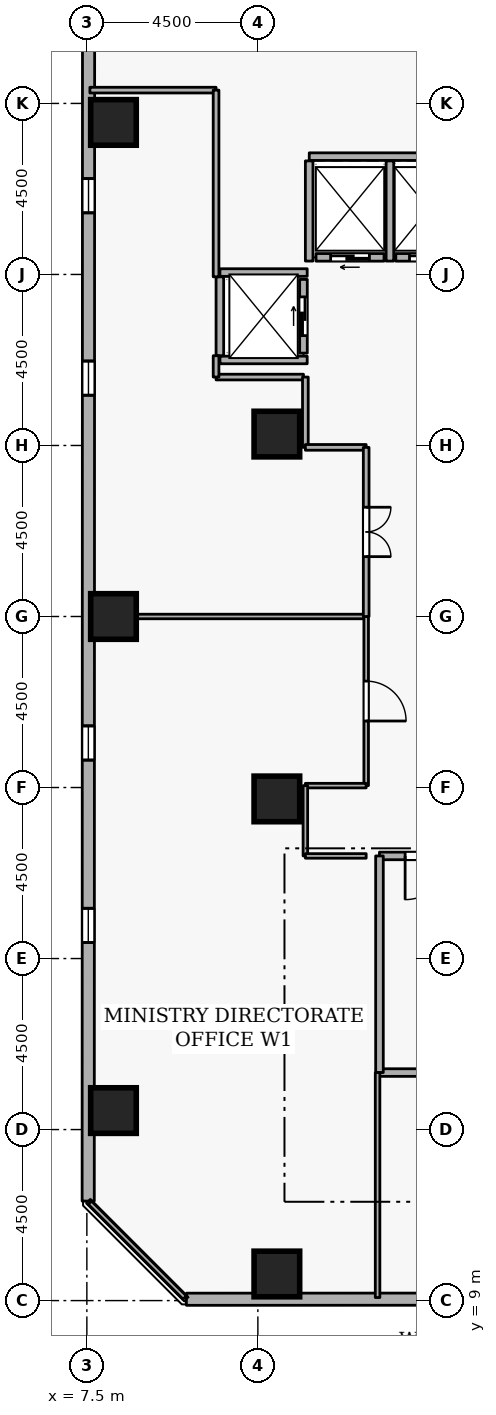
"""IFC4 building model, lengths in metres.
Left out: names, types, materials, properties, quantities, classifications, styles, units other than length and angle.
Written with IfcOpenShell. Run it as: python <this file> out.ifc"""

import sys

from ifc_helpers import new_model, si_unit, direction, frame, frame_2d, origin, origin_2d, place, context, subcontext, project, spatial, rectangle, extrude, element, fill, save


model = new_model("IFC4")
c1 = context("Model", 3, precision=1e-05, world=origin(), true_north=direction((0.0, 1.0)))
c2 = subcontext(c1, "Body", "Model", "MODEL_VIEW")
j1 = project(units=[si_unit("LENGTHUNIT", "METRE"), si_unit("PLANEANGLEUNIT", "RADIAN")], contexts=[c1])
p1 = place(None, origin())
s1 = spatial("IfcSite", under=j1, at=p1, CompositionType="ELEMENT")
p2 = place(p1, origin())
s2 = spatial("IfcBuilding", under=s1, at=p2, CompositionType="ELEMENT")
p3 = place(p2, frame((0.0, 0.0, 80.1)))
s3 = spatial("IfcBuildingStorey", under=s2, at=p3, CompositionType="ELEMENT", Elevation=80.1)
for number, where, z_axis, x_axis in (
    (1, (12.5, 9.7, 0.0), (0.0, 0.0, 1.0), (1.0, 0.0, 0.0)),
    (2, (8.2, 14.0, 0.0), (0.0, 0.0, 1.0), (1.0, 0.0, 0.0)),
    (3, (8.2, 27.0, 0.0), (0.0, 0.0, 1.0), (1.0, 0.0, 0.0)),
    (4, (8.2, 40.0, 0.0), (0.0, 0.0, 1.0), (1.0, 0.0, 0.0)),
    (5, (12.5, 22.2, 0.0), (0.0, 0.0, 1.0), (1.0, 0.0, 0.0)),
    (6, (12.5, 31.8, 0.0), (0.0, 0.0, 1.0), (1.0, 0.0, 0.0)),
):
    element("IfcColumn", number, at=place(p3, frame(where, z_axis=z_axis, x_axis=x_axis)), inside=s3, PredefinedType="COLUMN", context=c2, shape_type="SweptSolid", body=[
        extrude(rectangle(XDim=1.2, YDim=1.2, at=origin_2d()), origin(), (0.0, 0.0, 1.0), 3.6),
    ])
p4 = place(p3, frame((10.119, 9.035, 0.0), z_axis=(0.0, 0.0, 1.0), x_axis=(0.999999950907, 0.000313347115, 0.0)))
e7 = element("IfcWall", 7, at=p4, inside=s3, PredefinedType="STANDARD", context=c2, shape_type="SweptSolid", body=[
    extrude(rectangle(XDim=33.503, YDim=0.32, at=frame_2d((16.751, 0.0))), origin(), (0.0, 0.0, 1.0), 2.7),
])
p5 = place(p4, frame((6.6, 0.0, 0.72)))
e8 = element("IfcOpeningElement", 8, at=p5, cuts=e7, PredefinedType="OPENING", context=c2, shape_type="SweptSolid", body=[
    extrude(rectangle(XDim=0.9, YDim=1.75, at=frame_2d((0.45, 0.875))), frame((0.0, 0.17, 0.0), z_axis=(0.0, -1.0, 0.0), x_axis=(1.0, 0.0, 0.0)), (0.0, 0.0, 1.0), 0.34),
])
p6 = place(p4, frame((11.4, 0.0, 0.72)))
e9 = element("IfcOpeningElement", 9, at=p6, cuts=e7, PredefinedType="OPENING", context=c2, shape_type="SweptSolid", body=[
    extrude(rectangle(XDim=0.9, YDim=1.75, at=frame_2d((0.45, 0.875))), frame((0.0, 0.17, 0.0), z_axis=(0.0, -1.0, 0.0), x_axis=(1.0, 0.0, 0.0)), (0.0, 0.0, 1.0), 0.34),
])
p7 = place(p4, frame((21.0, 0.0, 0.72)))
e10 = element("IfcOpeningElement", 10, at=p7, cuts=e7, PredefinedType="OPENING", context=c2, shape_type="SweptSolid", body=[
    extrude(rectangle(XDim=0.9, YDim=1.75, at=frame_2d((0.45, 0.875))), frame((0.0, 0.17, 0.0), z_axis=(0.0, -1.0, 0.0), x_axis=(1.0, 0.0, 0.0)), (0.0, 0.0, 1.0), 0.34),
])
p8 = place(p4, frame((25.8, 0.0, 0.72)))
e11 = element("IfcOpeningElement", 11, at=p8, cuts=e7, PredefinedType="OPENING", context=c2, shape_type="SweptSolid", body=[
    extrude(rectangle(XDim=0.9, YDim=1.75, at=frame_2d((0.45, 0.875))), frame((0.0, 0.17, 0.0), z_axis=(0.0, -1.0, 0.0), x_axis=(1.0, 0.0, 0.0)), (0.0, 0.0, 1.0), 0.34),
])
p9 = place(p4, frame((30.6, 0.0, 0.72)))
e12 = element("IfcOpeningElement", 12, at=p9, cuts=e7, PredefinedType="OPENING", context=c2, shape_type="SweptSolid", body=[
    extrude(rectangle(XDim=0.9, YDim=1.75, at=frame_2d((0.45, 0.875))), frame((0.0, 0.17, 0.0), z_axis=(0.0, -1.0, 0.0), x_axis=(1.0, 0.0, 0.0)), (0.0, 0.0, 1.0), 0.34),
])
p10 = place(p3, frame((7.546, 45.122, 0.0), z_axis=(0.0, 0.0, 1.0), x_axis=(-0.000313347115, -0.999999950907, 0.0)))
e13 = element("IfcWall", 13, at=p10, inside=s3, PredefinedType="STANDARD", context=c2, shape_type="SweptSolid", body=[
    extrude(rectangle(XDim=33.503, YDim=0.32, at=frame_2d((16.751, 0.0))), origin(), (0.0, 0.0, 1.0), 2.7),
])
p11 = place(p10, frame((6.6, 0.0, 0.72)))
e14 = element("IfcOpeningElement", 14, at=p11, cuts=e13, PredefinedType="OPENING", context=c2, shape_type="SweptSolid", body=[
    extrude(rectangle(XDim=0.9, YDim=1.75, at=frame_2d((0.45, 0.875))), frame((0.0, 0.17, 0.0), z_axis=(0.0, -1.0, 0.0), x_axis=(1.0, 0.0, 0.0)), (0.0, 0.0, 1.0), 0.34),
])
p12 = place(p10, frame((11.4, 0.0, 0.72)))
e15 = element("IfcOpeningElement", 15, at=p12, cuts=e13, PredefinedType="OPENING", context=c2, shape_type="SweptSolid", body=[
    extrude(rectangle(XDim=0.9, YDim=1.75, at=frame_2d((0.45, 0.875))), frame((0.0, 0.17, 0.0), z_axis=(0.0, -1.0, 0.0), x_axis=(1.0, 0.0, 0.0)), (0.0, 0.0, 1.0), 0.34),
])
p13 = place(p10, frame((21.0, 0.0, 0.72)))
e16 = element("IfcOpeningElement", 16, at=p13, cuts=e13, PredefinedType="OPENING", context=c2, shape_type="SweptSolid", body=[
    extrude(rectangle(XDim=0.9, YDim=1.75, at=frame_2d((0.45, 0.875))), frame((0.0, 0.17, 0.0), z_axis=(0.0, -1.0, 0.0), x_axis=(1.0, 0.0, 0.0)), (0.0, 0.0, 1.0), 0.34),
])
p14 = place(p10, frame((25.8, 0.0, 0.72)))
e17 = element("IfcOpeningElement", 17, at=p14, cuts=e13, PredefinedType="OPENING", context=c2, shape_type="SweptSolid", body=[
    extrude(rectangle(XDim=0.9, YDim=1.75, at=frame_2d((0.45, 0.875))), frame((0.0, 0.17, 0.0), z_axis=(0.0, -1.0, 0.0), x_axis=(1.0, 0.0, 0.0)), (0.0, 0.0, 1.0), 0.34),
])
p15 = place(p3, frame((17.37, 36.45, 0.0), z_axis=(0.0, 0.0, 1.0), x_axis=(-1.0, 0.0, 0.0)))
e18 = element("IfcWall", 18, at=p15, inside=s3, PredefinedType="STANDARD", context=c2, shape_type="SweptSolid", body=[
    extrude(rectangle(XDim=1.74, YDim=0.2, at=frame_2d((0.87, 0.0))), origin(), (0.0, 0.0, 1.0), 3.34),
])
p16 = place(p15, frame((0.36, 0.0, 0.0)))
e19 = element("IfcOpeningElement", 19, at=p16, cuts=e18, PredefinedType="OPENING", context=c2, shape_type="SweptSolid", body=[
    extrude(rectangle(XDim=1.02, YDim=2.06, at=frame_2d((0.51, 1.03))), frame((0.0, 0.11, 0.0), z_axis=(0.0, -1.0, 0.0), x_axis=(1.0, 0.0, 0.0)), (0.0, 0.0, 1.0), 0.22),
])
p17 = place(p3, frame((15.32, 36.45, 0.0), z_axis=(0.0, 0.0, 1.0), x_axis=(-1.0, 0.0, 0.0)))
e20 = element("IfcWall", 20, at=p17, inside=s3, PredefinedType="STANDARD", context=c2, shape_type="SweptSolid", body=[
    extrude(rectangle(XDim=1.79, YDim=0.2, at=frame_2d((0.895, 0.0))), origin(), (0.0, 0.0, 1.0), 3.34),
])
p18 = place(p17, frame((0.385, 0.0, 0.0)))
e21 = element("IfcOpeningElement", 21, at=p18, cuts=e20, PredefinedType="OPENING", context=c2, shape_type="SweptSolid", body=[
    extrude(rectangle(XDim=1.02, YDim=2.06, at=frame_2d((0.51, 1.03))), frame((0.0, 0.11, 0.0), z_axis=(0.0, -1.0, 0.0), x_axis=(1.0, 0.0, 0.0)), (0.0, 0.0, 1.0), 0.22),
])
p19 = place(p3, frame((13.2, 33.93, 0.0), z_axis=(0.0, 0.0, 1.0), x_axis=(0.0, 1.0, 0.0)))
e22 = element("IfcWall", 22, at=p19, inside=s3, PredefinedType="STANDARD", context=c2, shape_type="SweptSolid", body=[
    extrude(rectangle(XDim=1.94, YDim=0.2, at=frame_2d((0.97, 0.0))), origin(), (0.0, 0.0, 1.0), 3.34),
])
p20 = place(p19, frame((0.46, 0.0, 0.0)))
e23 = element("IfcOpeningElement", 23, at=p20, cuts=e22, PredefinedType="OPENING", context=c2, shape_type="SweptSolid", body=[
    extrude(rectangle(XDim=1.02, YDim=2.06, at=frame_2d((0.51, 1.03))), frame((0.0, 0.11, 0.0), z_axis=(0.0, -1.0, 0.0), x_axis=(1.0, 0.0, 0.0)), (0.0, 0.0, 1.0), 0.22),
])
p21 = place(p3, frame((13.352, 39.1, 0.0), z_axis=(0.0, 0.0, 1.0), x_axis=(1.0, 0.0, 0.0)))
e24 = element("IfcWall", 24, at=p21, inside=s3, PredefinedType="STANDARD", context=c2, shape_type="SweptSolid", body=[
    extrude(rectangle(XDim=4.196, YDim=0.2, at=frame_2d((2.098, 0.0))), origin(), (0.0, 0.0, 1.0), 3.34),
])
for number, where, z_axis, x_axis in (
    (25, (15.475, 36.352, 0.0), (0.0, 0.0, 1.0), (0.0, 1.0, 0.0)),
    (26, (13.35, 36.352, 0.0), (0.0, 0.0, 1.0), (0.0, 1.0, 0.0)),
):
    element("IfcWall", number, at=place(p3, frame(where, z_axis=z_axis, x_axis=x_axis)), inside=s3, PredefinedType="STANDARD", context=c2, shape_type="SweptSolid", body=[
        extrude(rectangle(XDim=2.636, YDim=0.2, at=frame_2d((1.318, 0.0))), origin(), (0.0, 0.0, 1.0), 3.34),
    ])
for number, where, z_axis, x_axis in (
    (27, (11.002, 36.05, 0.0), (0.0, 0.0, 1.0), (1.0, 0.0, 0.0)),
    (28, (11.002, 33.75, 0.0), (0.0, 0.0, 1.0), (1.0, 0.0, 0.0)),
):
    element("IfcWall", number, at=place(p3, frame(where, z_axis=z_axis, x_axis=x_axis)), inside=s3, PredefinedType="STANDARD", context=c2, shape_type="SweptSolid", body=[
        extrude(rectangle(XDim=2.296, YDim=0.2, at=frame_2d((1.148, 0.0))), origin(), (0.0, 0.0, 1.0), 3.34),
    ])
p22 = place(p3, frame((11.0, 33.862, 0.0), z_axis=(0.0, 0.0, 1.0), x_axis=(0.0, 1.0, 0.0)))
e29 = element("IfcWall", 29, at=p22, inside=s3, PredefinedType="STANDARD", context=c2, shape_type="SweptSolid", body=[
    extrude(rectangle(XDim=2.076, YDim=0.2, at=frame_2d((1.038, 0.0))), origin(), (0.0, 0.0, 1.0), 3.34),
])
p23 = place(p3, frame((15.2, 15.0, 0.0), z_axis=(0.0, 0.0, 1.0), x_axis=(1.0, 0.0, 0.0)))
e30 = element("IfcWall", 30, at=p23, inside=s3, PredefinedType="STANDARD", context=c2, shape_type="SweptSolid", body=[
    extrude(rectangle(XDim=2.5, YDim=0.2, at=frame_2d((1.25, 0.0))), origin(), (0.0, 0.0, 1.0), 3.34),
])
p24 = place(p3, frame((17.7, 20.7, 0.0), z_axis=(0.0, 0.0, 1.0), x_axis=(-1.0, 0.0, 0.0)))
e31 = element("IfcWall", 31, at=p24, inside=s3, PredefinedType="STANDARD", context=c2, shape_type="SweptSolid", body=[
    extrude(rectangle(XDim=2.5, YDim=0.2, at=frame_2d((1.25, 0.0))), origin(), (0.0, 0.0, 1.0), 3.34),
])
p25 = place(p24, frame((0.675, 0.0, 0.0)))
e32 = element("IfcOpeningElement", 32, at=p25, cuts=e31, PredefinedType="OPENING", context=c2, shape_type="SweptSolid", body=[
    extrude(rectangle(XDim=1.15, YDim=2.1, at=frame_2d((0.575, 1.05))), frame((0.0, 0.11, 0.0), z_axis=(0.0, -1.0, 0.0), x_axis=(1.0, 0.0, 0.0)), (0.0, 0.0, 1.0), 0.22),
])
p26 = place(p3, frame((15.2, 20.7, 0.0), z_axis=(0.0, 0.0, 1.0), x_axis=(0.0, -1.0, 0.0)))
e33 = element("IfcWall", 33, at=p26, inside=s3, PredefinedType="STANDARD", context=c2, shape_type="SweptSolid", body=[
    extrude(rectangle(XDim=5.7, YDim=0.2, at=frame_2d((2.85, 0.0))), origin(), (0.0, 0.0, 1.0), 3.34),
])
p27 = place(p3, frame((7.58, 27.0, 0.0), z_axis=(0.0, 0.0, 1.0), x_axis=(1.0, 0.0, 0.0)))
e34 = element("IfcWall", 34, at=p27, inside=s3, PredefinedType="PARTITIONING", context=c2, shape_type="SweptSolid", body=[
    extrude(rectangle(XDim=7.27, YDim=0.12, at=frame_2d((3.635, 0.0))), origin(), (0.0, 0.0, 1.0), 2.882),
])
p28 = place(p3, frame((14.85, 27.0, 0.0), z_axis=(0.0, 0.0, 1.0), x_axis=(0.0, -1.0, 0.0)))
e35 = element("IfcWall", 35, at=p28, inside=s3, PredefinedType="PARTITIONING", context=c2, shape_type="SweptSolid", body=[
    extrude(rectangle(XDim=4.45, YDim=0.12, at=frame_2d((2.225, 0.0))), origin(), (0.0, 0.0, 1.0), 3.34),
])
p29 = place(p28, frame((1.7, 0.0, 0.0)))
e36 = element("IfcOpeningElement", 36, at=p29, cuts=e35, PredefinedType="OPENING", context=c2, shape_type="SweptSolid", body=[
    extrude(rectangle(XDim=1.05, YDim=2.1, at=frame_2d((0.525, 1.05))), frame((0.0, 0.07, 0.0), z_axis=(0.0, -1.0, 0.0), x_axis=(1.0, 0.0, 0.0)), (0.0, 0.0, 1.0), 0.14),
])
p30 = place(p3, frame((14.85, 22.55, 0.0), z_axis=(0.0, 0.0, 1.0), x_axis=(-1.0, 0.0, 0.0)))
e37 = element("IfcWall", 37, at=p30, inside=s3, PredefinedType="PARTITIONING", context=c2, shape_type="SweptSolid", body=[
    extrude(rectangle(XDim=1.6, YDim=0.12, at=frame_2d((0.8, 0.0))), origin(), (0.0, 0.0, 1.0), 3.34),
])
p31 = place(p3, frame((13.25, 22.55, 0.0), z_axis=(0.0, 0.0, 1.0), x_axis=(0.0, -1.0, 0.0)))
e38 = element("IfcWall", 38, at=p31, inside=s3, PredefinedType="PARTITIONING", context=c2, shape_type="SweptSolid", body=[
    extrude(rectangle(XDim=1.85, YDim=0.12, at=frame_2d((0.925, 0.0))), origin(), (0.0, 0.0, 1.0), 3.34),
])
p32 = place(p3, frame((13.25, 20.7, 0.0), z_axis=(0.0, 0.0, 1.0), x_axis=(1.0, 0.0, 0.0)))
e39 = element("IfcWall", 39, at=p32, inside=s3, PredefinedType="PARTITIONING", context=c2, shape_type="SweptSolid", body=[
    extrude(rectangle(XDim=1.6, YDim=0.12, at=frame_2d((0.8, 0.0))), origin(), (0.0, 0.0, 1.0), 3.34),
])
p33 = place(p3, frame((15.15, 15.0, 0.0), z_axis=(0.0, 0.0, 1.0), x_axis=(0.0, -1.0, 0.0)))
e40 = element("IfcWall", 40, at=p33, inside=s3, PredefinedType="PARTITIONING", context=c2, shape_type="SweptSolid", body=[
    extrude(rectangle(XDim=5.92, YDim=0.12, at=frame_2d((2.96, 0.0))), origin(), (0.0, 0.0, 1.0), 3.34),
])
p34 = place(p3, frame((10.075, 9.08, 0.0), z_axis=(0.0, 0.0, 1.0), x_axis=(-0.707106781187, 0.707106781187, 0.0)))
e41 = element("IfcWall", 41, at=p34, inside=s3, PredefinedType="PARTITIONING", context=c2, shape_type="SweptSolid", body=[
    extrude(rectangle(XDim=3.528, YDim=0.12, at=frame_2d((1.764, 0.0))), origin(), (0.0, 0.0, 1.0), 3.34),
])
p35 = place(p3, frame((10.9, 33.3, 0.0), z_axis=(0.0, 0.0, 1.0), x_axis=(1.0, 0.0, 0.0)))
e42 = element("IfcWall", 42, at=p35, inside=s3, PredefinedType="PARTITIONING", context=c2, shape_type="SweptSolid", body=[
    extrude(rectangle(XDim=2.3, YDim=0.15, at=frame_2d((1.15, 0.0))), origin(), (0.0, 0.0, 1.0), 3.34),
])
p36 = place(p3, frame((13.25, 33.3, 0.0), z_axis=(0.0, 0.0, 1.0), x_axis=(0.0, -1.0, 0.0)))
e43 = element("IfcWall", 43, at=p36, inside=s3, PredefinedType="PARTITIONING", context=c2, shape_type="SweptSolid", body=[
    extrude(rectangle(XDim=1.85, YDim=0.15, at=frame_2d((0.925, 0.0))), origin(), (0.0, 0.0, 1.0), 3.34),
])
p37 = place(p3, frame((13.25, 31.45, 0.0), z_axis=(0.0, 0.0, 1.0), x_axis=(1.0, 0.0, 0.0)))
e44 = element("IfcWall", 44, at=p37, inside=s3, PredefinedType="PARTITIONING", context=c2, shape_type="SweptSolid", body=[
    extrude(rectangle(XDim=1.6, YDim=0.15, at=frame_2d((0.8, 0.0))), origin(), (0.0, 0.0, 1.0), 3.34),
])
p38 = place(p3, frame((14.85, 31.45, 0.0), z_axis=(0.0, 0.0, 1.0), x_axis=(0.0, -1.0, 0.0)))
e45 = element("IfcWall", 45, at=p38, inside=s3, PredefinedType="PARTITIONING", context=c2, shape_type="SweptSolid", body=[
    extrude(rectangle(XDim=4.45, YDim=0.15, at=frame_2d((2.225, 0.0))), origin(), (0.0, 0.0, 1.0), 3.34),
])
p39 = place(p38, frame((1.575, 0.0, 0.0)))
e46 = element("IfcOpeningElement", 46, at=p39, cuts=e45, PredefinedType="OPENING", context=c2, shape_type="SweptSolid", body=[
    extrude(rectangle(XDim=1.3, YDim=2.12, at=frame_2d((0.65, 1.06))), frame((0.0, 0.085, 0.0), z_axis=(0.0, -1.0, 0.0), x_axis=(1.0, 0.0, 0.0)), (0.0, 0.0, 1.0), 0.17),
])
p40 = place(p3, frame((7.58, 40.85, 0.0), z_axis=(0.0, 0.0, 1.0), x_axis=(1.0, 0.0, 0.0)))
e47 = element("IfcWall", 47, at=p40, inside=s3, PredefinedType="PARTITIONING", context=c2, shape_type="SweptSolid", body=[
    extrude(rectangle(XDim=3.32, YDim=0.15, at=frame_2d((1.66, 0.0))), origin(), (0.0, 0.0, 1.0), 3.34),
])
p41 = place(p3, frame((10.9, 40.85, 0.0), z_axis=(0.0, 0.0, 1.0), x_axis=(0.0, -1.0, 0.0)))
e48 = element("IfcWall", 48, at=p41, inside=s3, PredefinedType="PARTITIONING", context=c2, shape_type="SweptSolid", body=[
    extrude(rectangle(XDim=4.912, YDim=0.15, at=frame_2d((2.456, 0.0))), origin(), (0.0, 0.0, 1.0), 3.34),
])
p42 = place(p3, frame((10.9, 33.862, 0.0), z_axis=(0.0, 0.0, 1.0), x_axis=(0.0, -1.0, 0.0)))
e49 = element("IfcWall", 49, at=p42, inside=s3, PredefinedType="PARTITIONING", context=c2, shape_type="SweptSolid", body=[
    extrude(rectangle(XDim=0.562, YDim=0.15, at=frame_2d((0.281, 0.0))), origin(), (0.0, 0.0, 1.0), 3.34),
])
p43 = place(p11, origin())
e50 = element("IfcWindow", 50, at=p43, inside=s3, PartitioningType="SINGLE_PANEL", PredefinedType="WINDOW", context=c2, shape_type="SweptSolid", body=[
    extrude(rectangle(XDim=0.9, YDim=1.75, at=frame_2d((0.45, 0.875))), frame((0.0, 0.03, 0.0), z_axis=(0.0, -1.0, 0.0), x_axis=(1.0, 0.0, 0.0)), (0.0, 0.0, 1.0), 0.06),
])
fill(e14, e50)
p44 = place(p12, origin())
e51 = element("IfcWindow", 51, at=p44, inside=s3, PartitioningType="SINGLE_PANEL", PredefinedType="WINDOW", context=c2, shape_type="SweptSolid", body=[
    extrude(rectangle(XDim=0.9, YDim=1.75, at=frame_2d((0.45, 0.875))), frame((0.0, 0.03, 0.0), z_axis=(0.0, -1.0, 0.0), x_axis=(1.0, 0.0, 0.0)), (0.0, 0.0, 1.0), 0.06),
])
fill(e15, e51)
p45 = place(p13, origin())
e52 = element("IfcWindow", 52, at=p45, inside=s3, PartitioningType="SINGLE_PANEL", PredefinedType="WINDOW", context=c2, shape_type="SweptSolid", body=[
    extrude(rectangle(XDim=0.9, YDim=1.75, at=frame_2d((0.45, 0.875))), frame((0.0, 0.03, 0.0), z_axis=(0.0, -1.0, 0.0), x_axis=(1.0, 0.0, 0.0)), (0.0, 0.0, 1.0), 0.06),
])
fill(e16, e52)
p46 = place(p14, origin())
e53 = element("IfcWindow", 53, at=p46, inside=s3, PartitioningType="SINGLE_PANEL", PredefinedType="WINDOW", context=c2, shape_type="SweptSolid", body=[
    extrude(rectangle(XDim=0.9, YDim=1.75, at=frame_2d((0.45, 0.875))), frame((0.0, 0.03, 0.0), z_axis=(0.0, -1.0, 0.0), x_axis=(1.0, 0.0, 0.0)), (0.0, 0.0, 1.0), 0.06),
])
fill(e17, e53)
p47 = place(p16, origin())
e54 = element("IfcDoor", 54, at=p47, inside=s3, OperationType="SLIDING_TO_LEFT", PredefinedType="DOOR", context=c2, shape_type="SweptSolid", body=[
    extrude(rectangle(XDim=1.02, YDim=2.06, at=frame_2d((0.51, 1.03))), frame((0.0, 0.025, 0.0), z_axis=(0.0, -1.0, 0.0), x_axis=(1.0, 0.0, 0.0)), (0.0, 0.0, 1.0), 0.05),
])
fill(e19, e54)
p48 = place(p18, origin())
e55 = element("IfcDoor", 55, at=p48, inside=s3, OperationType="SLIDING_TO_LEFT", PredefinedType="DOOR", context=c2, shape_type="SweptSolid", body=[
    extrude(rectangle(XDim=1.02, YDim=2.06, at=frame_2d((0.51, 1.03))), frame((0.0, 0.025, 0.0), z_axis=(0.0, -1.0, 0.0), x_axis=(1.0, 0.0, 0.0)), (0.0, 0.0, 1.0), 0.05),
])
fill(e21, e55)
p49 = place(p20, origin())
e56 = element("IfcDoor", 56, at=p49, inside=s3, OperationType="SLIDING_TO_LEFT", PredefinedType="DOOR", context=c2, shape_type="SweptSolid", body=[
    extrude(rectangle(XDim=1.02, YDim=2.06, at=frame_2d((0.51, 1.03))), frame((0.0, 0.025, 0.0), z_axis=(0.0, -1.0, 0.0), x_axis=(1.0, 0.0, 0.0)), (0.0, 0.0, 1.0), 0.05),
])
fill(e23, e56)
p50 = place(p25, origin())
e57 = element("IfcDoor", 57, at=p50, inside=s3, OperationType="SINGLE_SWING_RIGHT", PredefinedType="DOOR", context=c2, shape_type="SweptSolid", body=[
    extrude(rectangle(XDim=1.15, YDim=2.1, at=frame_2d((0.575, 1.05))), frame((0.0, 0.025, 0.0), z_axis=(0.0, -1.0, 0.0), x_axis=(1.0, 0.0, 0.0)), (0.0, 0.0, 1.0), 0.05),
])
fill(e32, e57)
p51 = place(p29, origin())
e58 = element("IfcDoor", 58, at=p51, inside=s3, OperationType="SINGLE_SWING_RIGHT", PredefinedType="DOOR", context=c2, shape_type="SweptSolid", body=[
    extrude(rectangle(XDim=1.05, YDim=2.1, at=frame_2d((0.525, 1.05))), frame((0.0, 0.025, 0.0), z_axis=(0.0, -1.0, 0.0), x_axis=(1.0, 0.0, 0.0)), (0.0, 0.0, 1.0), 0.05),
])
fill(e36, e58)
p52 = place(p39, origin())
e59 = element("IfcDoor", 59, at=p52, inside=s3, OperationType="DOUBLE_DOOR_SINGLE_SWING", PredefinedType="DOOR", context=c2, shape_type="SweptSolid", body=[
    extrude(rectangle(XDim=1.3, YDim=2.12, at=frame_2d((0.65, 1.06))), frame((0.0, 0.025, 0.0), z_axis=(0.0, -1.0, 0.0), x_axis=(1.0, 0.0, 0.0)), (0.0, 0.0, 1.0), 0.05),
])
fill(e46, e59)
save(model, sys.argv[1])
